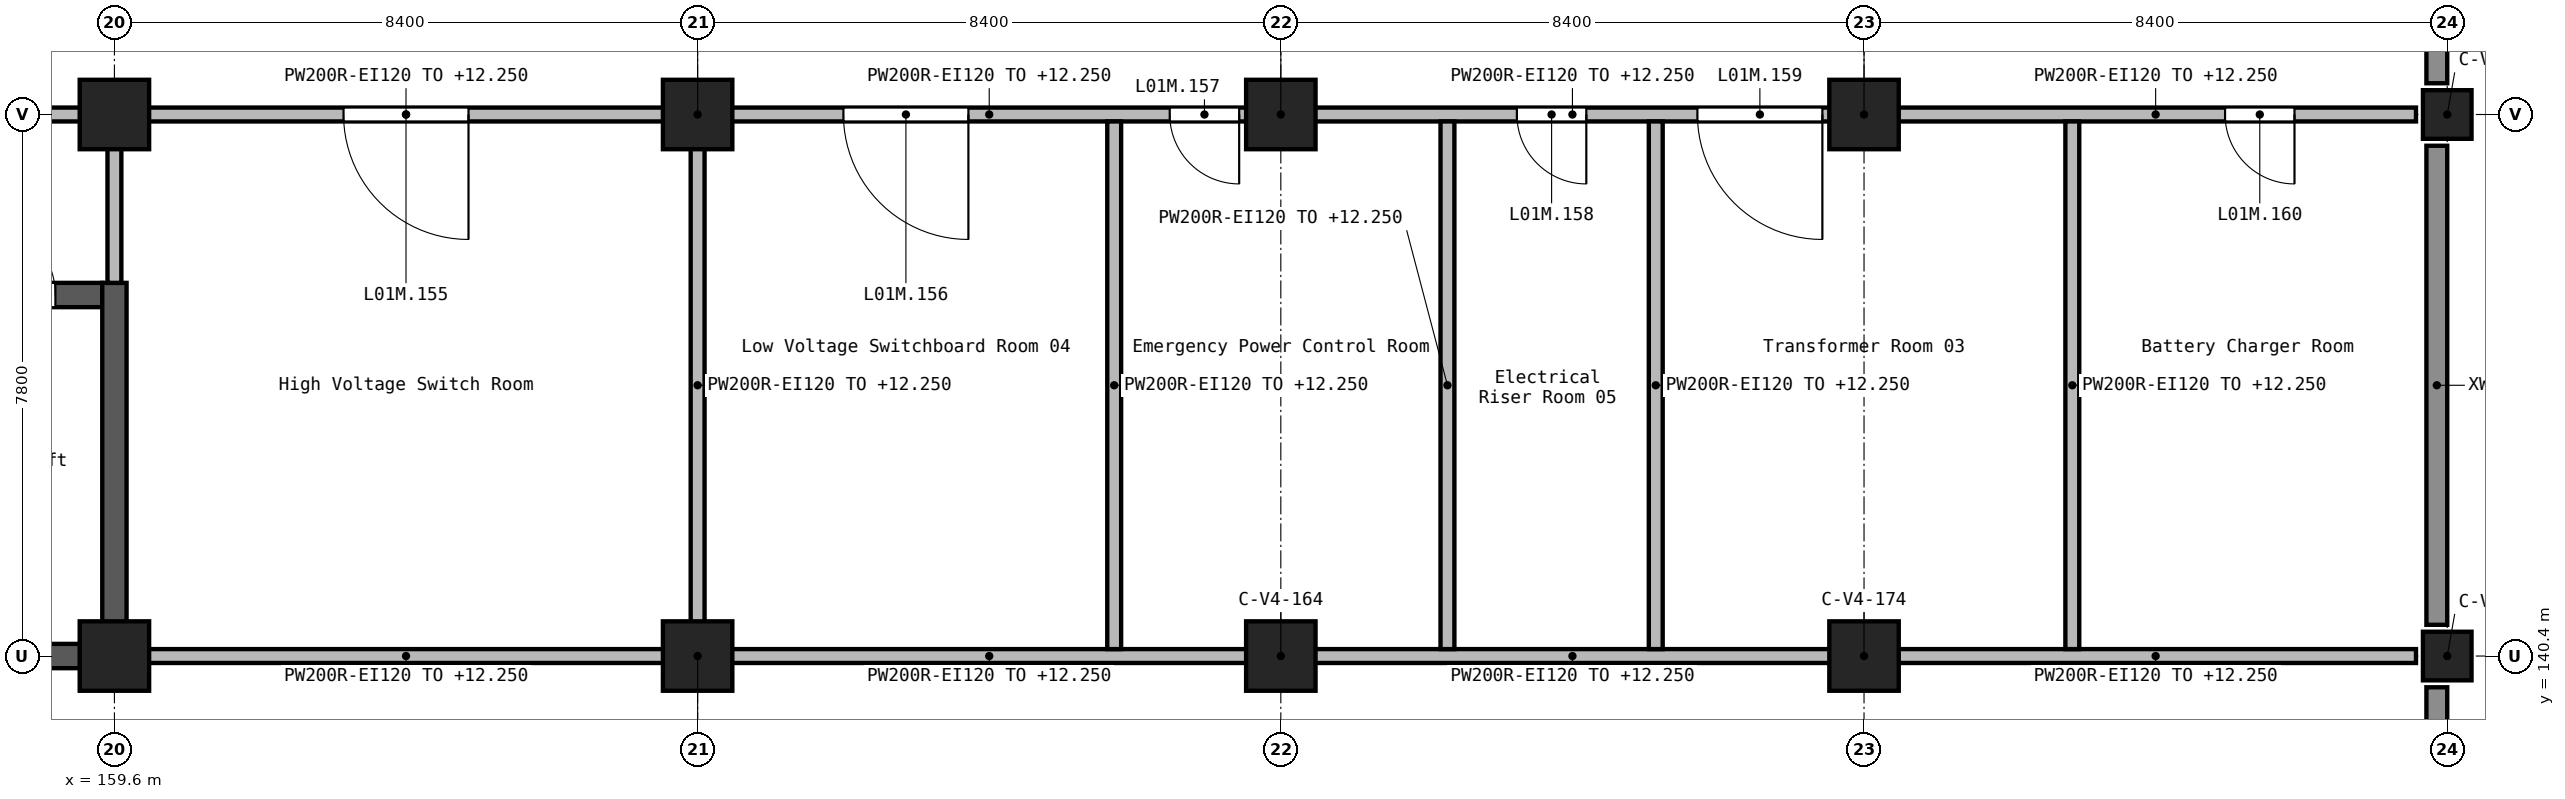
"""IFC4 building model, lengths in metres.
Left out: names, types, materials, properties, quantities, classifications, styles, units other than length and angle.
Written with IfcOpenShell. Run it as: python <this file> out.ifc"""

import sys

from ifc_helpers import new_model, si_unit, direction, frame, frame_2d, origin, origin_2d, place, context, subcontext, project, spatial, rectangle, extrude, element, fill, save


model = new_model("IFC4")
c1 = context("Model", 3, precision=1e-05, world=origin(), true_north=direction((0.0, 1.0)))
c2 = subcontext(c1, "Body", "Model", "MODEL_VIEW")
j1 = project(units=[si_unit("LENGTHUNIT", "METRE"), si_unit("PLANEANGLEUNIT", "RADIAN")], contexts=[c1])
p1 = place(None, origin())
s1 = spatial("IfcSite", under=j1, at=p1, CompositionType="ELEMENT")
p2 = place(p1, origin())
s2 = spatial("IfcBuilding", under=s1, at=p2, CompositionType="ELEMENT")
p3 = place(p2, frame((0.0, 0.0, 9.9)))
s3 = spatial("IfcBuildingStorey", under=s2, at=p3, CompositionType="ELEMENT", Elevation=9.9)
for number, where, z_axis, x_axis in (
    (1, (159.6, 140.4, 0.0), (0.0, 0.0, 1.0), (1.0, 0.0, 0.0)),
    (2, (159.6, 148.2, 0.0), (0.0, 0.0, 1.0), (1.0, 0.0, 0.0)),
    (3, (168.0, 140.4, 0.0), (0.0, 0.0, 1.0), (1.0, 0.0, 0.0)),
    (4, (168.0, 148.2, 0.0), (0.0, 0.0, 1.0), (1.0, 0.0, 0.0)),
    (5, (176.4, 140.4, 0.0), (0.0, 0.0, 1.0), (1.0, 0.0, 0.0)),
    (6, (176.4, 148.2, 0.0), (0.0, 0.0, 1.0), (1.0, 0.0, 0.0)),
    (7, (184.8, 140.4, 0.0), (0.0, 0.0, 1.0), (1.0, 0.0, 0.0)),
    (8, (184.8, 148.2, 0.0), (0.0, 0.0, 1.0), (1.0, 0.0, 0.0)),
):
    element("IfcColumn", number, at=place(p3, frame(where, z_axis=z_axis, x_axis=x_axis)), inside=s3, PredefinedType="COLUMN", context=c2, shape_type="SweptSolid", body=[
        extrude(rectangle(XDim=1.0, YDim=1.0, at=origin_2d()), origin(), (0.0, 0.0, 1.0), 2.7),
    ])
for number, where, z_axis, x_axis in (
    (9, (193.2, 140.4, 0.0), (0.0, 0.0, 1.0), (1.0, 0.0, 0.0)),
    (10, (193.2, 148.2, 0.0), (0.0, 0.0, 1.0), (1.0, 0.0, 0.0)),
):
    element("IfcColumn", number, at=place(p3, frame(where, z_axis=z_axis, x_axis=x_axis)), inside=s3, PredefinedType="COLUMN", context=c2, shape_type="SweptSolid", body=[
        extrude(rectangle(XDim=0.7, YDim=0.7, at=origin_2d()), origin(), (0.0, 0.0, 1.0), 2.7),
    ])
p4 = place(p3, frame((156.8, 140.4, 0.0), z_axis=(0.0, 0.0, 1.0), x_axis=(1.0, 0.0, 0.0)))
e11 = element("IfcWall", 11, at=p4, inside=s3, PredefinedType="SHEAR", context=c2, shape_type="SweptSolid", body=[
    extrude(rectangle(XDim=2.625, YDim=0.35, at=frame_2d((1.312, 0.0))), origin(), (0.0, 0.0, 1.0), 2.7),
])
p5 = place(p3, frame((156.8, 145.6, 0.0), z_axis=(0.0, 0.0, 1.0), x_axis=(1.0, 0.0, 0.0)))
e12 = element("IfcWall", 12, at=p5, inside=s3, PredefinedType="SHEAR", context=c2, shape_type="SweptSolid", body=[
    extrude(rectangle(XDim=2.625, YDim=0.35, at=frame_2d((1.312, 0.0))), origin(), (0.0, 0.0, 1.0), 2.7),
])
p6 = place(p5, frame((0.85, 0.0, 0.0)))
e13 = element("IfcOpeningElement", 13, at=p6, cuts=e12, PredefinedType="OPENING", context=c2, shape_type="SweptSolid", body=[
    extrude(rectangle(XDim=1.1, YDim=2.1, at=frame_2d((0.55, 1.05))), frame((0.0, 0.185, 0.0), z_axis=(0.0, -1.0, 0.0), x_axis=(1.0, 0.0, 0.0)), (0.0, 0.0, 1.0), 0.37),
])
p7 = place(p3, frame((159.6, 140.225, 0.0), z_axis=(0.0, 0.0, 1.0), x_axis=(0.0, 1.0, 0.0)))
e14 = element("IfcWall", 14, at=p7, inside=s3, PredefinedType="SHEAR", context=c2, shape_type="SweptSolid", body=[
    extrude(rectangle(XDim=5.55, YDim=0.35, at=frame_2d((2.775, 0.0))), origin(), (0.0, 0.0, 1.0), 2.7),
])
p8 = place(p3, frame((193.05, 137.25, 0.0), z_axis=(0.0, 0.0, 1.0), x_axis=(0.0, 1.0, 0.0)))
e15 = element("IfcWall", 15, at=p8, inside=s3, PredefinedType="STANDARD", context=c2, shape_type="SweptSolid", body=[
    extrude(rectangle(XDim=2.7, YDim=0.3, at=frame_2d((1.35, 0.0))), origin(), (0.0, 0.0, 1.0), 1.55),
])
p9 = place(p3, frame((193.05, 140.85, 0.0), z_axis=(0.0, 0.0, 1.0), x_axis=(0.0, 1.0, 0.0)))
e16 = element("IfcWall", 16, at=p9, inside=s3, PredefinedType="STANDARD", context=c2, shape_type="SweptSolid", body=[
    extrude(rectangle(XDim=6.9, YDim=0.3, at=frame_2d((3.45, 0.0))), origin(), (0.0, 0.0, 1.0), 1.55),
])
p10 = place(p3, frame((193.05, 148.65, 0.0), z_axis=(0.0, 0.0, 1.0), x_axis=(0.0, 1.0, 0.0)))
e17 = element("IfcWall", 17, at=p10, inside=s3, PredefinedType="STANDARD", context=c2, shape_type="SweptSolid", body=[
    extrude(rectangle(XDim=2.7, YDim=0.3, at=frame_2d((1.35, 0.0))), origin(), (0.0, 0.0, 1.0), 1.55),
])
p11 = place(p3, frame((192.75, 148.2, 0.0), z_axis=(0.0, 0.0, 1.0), x_axis=(-1.0, 0.0, 0.0)))
e18 = element("IfcWall", 18, at=p11, inside=s3, PredefinedType="SOLIDWALL", context=c2, shape_type="SweptSolid", body=[
    extrude(rectangle(XDim=7.5, YDim=0.2, at=frame_2d((3.75, 0.0))), origin(), (0.0, 0.0, 1.0), 2.35),
])
p12 = place(p11, frame((1.75, 0.0, 0.0)))
e19 = element("IfcOpeningElement", 19, at=p12, cuts=e18, PredefinedType="OPENING", context=c2, shape_type="SweptSolid", body=[
    extrude(rectangle(XDim=1.0, YDim=2.1, at=frame_2d((0.5, 1.05))), frame((0.0, 0.11, 0.0), z_axis=(0.0, -1.0, 0.0), x_axis=(1.0, 0.0, 0.0)), (0.0, 0.0, 1.0), 0.22),
])
p13 = place(p3, frame((184.35, 148.2, 0.0), z_axis=(0.0, 0.0, 1.0), x_axis=(-1.0, 0.0, 0.0)))
e20 = element("IfcWall", 20, at=p13, inside=s3, PredefinedType="SOLIDWALL", context=c2, shape_type="SweptSolid", body=[
    extrude(rectangle(XDim=7.5, YDim=0.2, at=frame_2d((3.75, 0.0))), origin(), (0.0, 0.0, 1.0), 2.35),
])
p14 = place(p13, frame((3.55, 0.0, 0.0)))
e21 = element("IfcOpeningElement", 21, at=p14, cuts=e20, PredefinedType="OPENING", context=c2, shape_type="SweptSolid", body=[
    extrude(rectangle(XDim=1.0, YDim=2.1, at=frame_2d((0.5, 1.05))), frame((0.0, 0.11, 0.0), z_axis=(0.0, -1.0, 0.0), x_axis=(1.0, 0.0, 0.0)), (0.0, 0.0, 1.0), 0.22),
])
p15 = place(p13, frame((0.15, 0.0, 0.0)))
e22 = element("IfcOpeningElement", 22, at=p15, cuts=e20, PredefinedType="OPENING", context=c2, shape_type="SweptSolid", body=[
    extrude(rectangle(XDim=1.8, YDim=2.1, at=frame_2d((0.9, 1.05))), frame((0.0, 0.11, 0.0), z_axis=(0.0, -1.0, 0.0), x_axis=(1.0, 0.0, 0.0)), (0.0, 0.0, 1.0), 0.22),
])
p16 = place(p3, frame((175.95, 148.2, 0.0), z_axis=(0.0, 0.0, 1.0), x_axis=(-1.0, 0.0, 0.0)))
e23 = element("IfcWall", 23, at=p16, inside=s3, PredefinedType="SOLIDWALL", context=c2, shape_type="SweptSolid", body=[
    extrude(rectangle(XDim=7.5, YDim=0.2, at=frame_2d((3.75, 0.0))), origin(), (0.0, 0.0, 1.0), 2.35),
])
p17 = place(p16, frame((4.05, 0.0, 0.0)))
e24 = element("IfcOpeningElement", 24, at=p17, cuts=e23, PredefinedType="OPENING", context=c2, shape_type="SweptSolid", body=[
    extrude(rectangle(XDim=1.8, YDim=2.1, at=frame_2d((0.9, 1.05))), frame((0.0, 0.11, 0.0), z_axis=(0.0, -1.0, 0.0), x_axis=(1.0, 0.0, 0.0)), (0.0, 0.0, 1.0), 0.22),
])
p18 = place(p16, frame((0.15, 0.0, 0.0)))
e25 = element("IfcOpeningElement", 25, at=p18, cuts=e23, PredefinedType="OPENING", context=c2, shape_type="SweptSolid", body=[
    extrude(rectangle(XDim=1.0, YDim=2.1, at=frame_2d((0.5, 1.05))), frame((0.0, 0.11, 0.0), z_axis=(0.0, -1.0, 0.0), x_axis=(1.0, 0.0, 0.0)), (0.0, 0.0, 1.0), 0.22),
])
p19 = place(p3, frame((167.55, 148.2, 0.0), z_axis=(0.0, 0.0, 1.0), x_axis=(-1.0, 0.0, 0.0)))
e26 = element("IfcWall", 26, at=p19, inside=s3, PredefinedType="SOLIDWALL", context=c2, shape_type="SweptSolid", body=[
    extrude(rectangle(XDim=7.5, YDim=0.2, at=frame_2d((3.75, 0.0))), origin(), (0.0, 0.0, 1.0), 2.35),
])
p20 = place(p19, frame((2.85, 0.0, 0.0)))
e27 = element("IfcOpeningElement", 27, at=p20, cuts=e26, PredefinedType="OPENING", context=c2, shape_type="SweptSolid", body=[
    extrude(rectangle(XDim=1.8, YDim=2.1, at=frame_2d((0.9, 1.05))), frame((0.0, 0.11, 0.0), z_axis=(0.0, -1.0, 0.0), x_axis=(1.0, 0.0, 0.0)), (0.0, 0.0, 1.0), 0.22),
])
p21 = place(p3, frame((159.15, 148.2, 0.0), z_axis=(0.0, 0.0, 1.0), x_axis=(-1.0, 0.0, 0.0)))
e28 = element("IfcWall", 28, at=p21, inside=s3, PredefinedType="SOLIDWALL", context=c2, shape_type="SweptSolid", body=[
    extrude(rectangle(XDim=7.5, YDim=0.2, at=frame_2d((3.75, 0.0))), origin(), (0.0, 0.0, 1.0), 2.35),
])
p22 = place(p21, frame((2.85, 0.0, 0.0)))
e29 = element("IfcOpeningElement", 29, at=p22, cuts=e28, PredefinedType="OPENING", context=c2, shape_type="SweptSolid", body=[
    extrude(rectangle(XDim=1.8, YDim=2.1, at=frame_2d((0.9, 1.05))), frame((0.0, 0.11, 0.0), z_axis=(0.0, -1.0, 0.0), x_axis=(1.0, 0.0, 0.0)), (0.0, 0.0, 1.0), 0.22),
])
for number, where, z_axis, x_axis in (
    (30, (192.75, 140.4, 0.0), (0.0, 0.0, 1.0), (-1.0, 0.0, 0.0)),
    (31, (184.35, 140.4, 0.0), (0.0, 0.0, 1.0), (-1.0, 0.0, 0.0)),
    (32, (175.95, 140.4, 0.0), (0.0, 0.0, 1.0), (-1.0, 0.0, 0.0)),
    (33, (167.55, 140.4, 0.0), (0.0, 0.0, 1.0), (-1.0, 0.0, 0.0)),
):
    element("IfcWall", number, at=place(p3, frame(where, z_axis=z_axis, x_axis=x_axis)), inside=s3, PredefinedType="SOLIDWALL", context=c2, shape_type="SweptSolid", body=[
        extrude(rectangle(XDim=7.5, YDim=0.2, at=frame_2d((3.75, 0.0))), origin(), (0.0, 0.0, 1.0), 2.35),
    ])
p23 = place(p3, frame((159.6, 145.775, 0.0), z_axis=(0.0, 0.0, 1.0), x_axis=(0.0, 1.0, 0.0)))
e34 = element("IfcWall", 34, at=p23, inside=s3, PredefinedType="SOLIDWALL", context=c2, shape_type="SweptSolid", body=[
    extrude(rectangle(XDim=1.975, YDim=0.2, at=frame_2d((0.988, 0.0))), origin(), (0.0, 0.0, 1.0), 2.35),
])
p24 = place(p3, frame((168.0, 140.85, 0.0), z_axis=(0.0, 0.0, 1.0), x_axis=(0.0, 1.0, 0.0)))
e35 = element("IfcWall", 35, at=p24, inside=s3, PredefinedType="SOLIDWALL", context=c2, shape_type="SweptSolid", body=[
    extrude(rectangle(XDim=6.9, YDim=0.2, at=frame_2d((3.45, 0.0))), origin(), (0.0, 0.0, 1.0), 2.35),
])
for number, where, z_axis, x_axis in (
    (36, (174.0, 140.5, 0.0), (0.0, 0.0, 1.0), (0.0, 1.0, 0.0)),
    (37, (178.8, 140.5, 0.0), (0.0, 0.0, 1.0), (0.0, 1.0, 0.0)),
    (38, (181.8, 140.5, 0.0), (0.0, 0.0, 1.0), (0.0, 1.0, 0.0)),
    (39, (187.8, 140.5, 0.0), (0.0, 0.0, 1.0), (0.0, 1.0, 0.0)),
):
    element("IfcWall", number, at=place(p3, frame(where, z_axis=z_axis, x_axis=x_axis)), inside=s3, PredefinedType="SOLIDWALL", context=c2, shape_type="SweptSolid", body=[
        extrude(rectangle(XDim=7.6, YDim=0.2, at=frame_2d((3.8, 0.0))), origin(), (0.0, 0.0, 1.0), 2.35),
    ])
p25 = place(p20, origin())
e40 = element("IfcDoor", 40, at=p25, inside=s3, OperationType="DOUBLE_DOOR_SINGLE_SWING", PredefinedType="DOOR", context=c2, shape_type="SweptSolid", body=[
    extrude(rectangle(XDim=1.8, YDim=2.1, at=frame_2d((0.9, 1.05))), frame((0.0, 0.025, 0.0), z_axis=(0.0, -1.0, 0.0), x_axis=(1.0, 0.0, 0.0)), (0.0, 0.0, 1.0), 0.05),
])
fill(e27, e40)
p26 = place(p17, origin())
e41 = element("IfcDoor", 41, at=p26, inside=s3, OperationType="DOUBLE_DOOR_SINGLE_SWING", PredefinedType="DOOR", context=c2, shape_type="SweptSolid", body=[
    extrude(rectangle(XDim=1.8, YDim=2.1, at=frame_2d((0.9, 1.05))), frame((0.0, 0.025, 0.0), z_axis=(0.0, -1.0, 0.0), x_axis=(1.0, 0.0, 0.0)), (0.0, 0.0, 1.0), 0.05),
])
fill(e24, e41)
p27 = place(p18, origin())
e42 = element("IfcDoor", 42, at=p27, inside=s3, OperationType="SINGLE_SWING_LEFT", PredefinedType="DOOR", context=c2, shape_type="SweptSolid", body=[
    extrude(rectangle(XDim=1.0, YDim=2.1, at=frame_2d((0.5, 1.05))), frame((0.0, 0.025, 0.0), z_axis=(0.0, -1.0, 0.0), x_axis=(1.0, 0.0, 0.0)), (0.0, 0.0, 1.0), 0.05),
])
fill(e25, e42)
p28 = place(p14, origin())
e43 = element("IfcDoor", 43, at=p28, inside=s3, OperationType="SINGLE_SWING_RIGHT", PredefinedType="DOOR", context=c2, shape_type="SweptSolid", body=[
    extrude(rectangle(XDim=1.0, YDim=2.1, at=frame_2d((0.5, 1.05))), frame((0.0, 0.025, 0.0), z_axis=(0.0, -1.0, 0.0), x_axis=(1.0, 0.0, 0.0)), (0.0, 0.0, 1.0), 0.05),
])
fill(e21, e43)
p29 = place(p15, origin())
e44 = element("IfcDoor", 44, at=p29, inside=s3, OperationType="DOUBLE_DOOR_SINGLE_SWING", PredefinedType="DOOR", context=c2, shape_type="SweptSolid", body=[
    extrude(rectangle(XDim=1.8, YDim=2.1, at=frame_2d((0.9, 1.05))), frame((0.0, 0.025, 0.0), z_axis=(0.0, -1.0, 0.0), x_axis=(1.0, 0.0, 0.0)), (0.0, 0.0, 1.0), 0.05),
])
fill(e22, e44)
p30 = place(p12, origin())
e45 = element("IfcDoor", 45, at=p30, inside=s3, OperationType="SINGLE_SWING_LEFT", PredefinedType="DOOR", context=c2, shape_type="SweptSolid", body=[
    extrude(rectangle(XDim=1.0, YDim=2.1, at=frame_2d((0.5, 1.05))), frame((0.0, 0.025, 0.0), z_axis=(0.0, -1.0, 0.0), x_axis=(1.0, 0.0, 0.0)), (0.0, 0.0, 1.0), 0.05),
])
fill(e19, e45)
p31 = place(p6, origin())
e46 = element("IfcDoor", 46, at=p31, inside=s3, OperationType="DOUBLE_DOOR_SLIDING", PredefinedType="DOOR", context=c2, shape_type="SweptSolid", body=[
    extrude(rectangle(XDim=1.1, YDim=2.1, at=frame_2d((0.55, 1.05))), frame((0.0, 0.025, 0.0), z_axis=(0.0, -1.0, 0.0), x_axis=(1.0, 0.0, 0.0)), (0.0, 0.0, 1.0), 0.05),
])
fill(e13, e46)
save(model, sys.argv[1])
